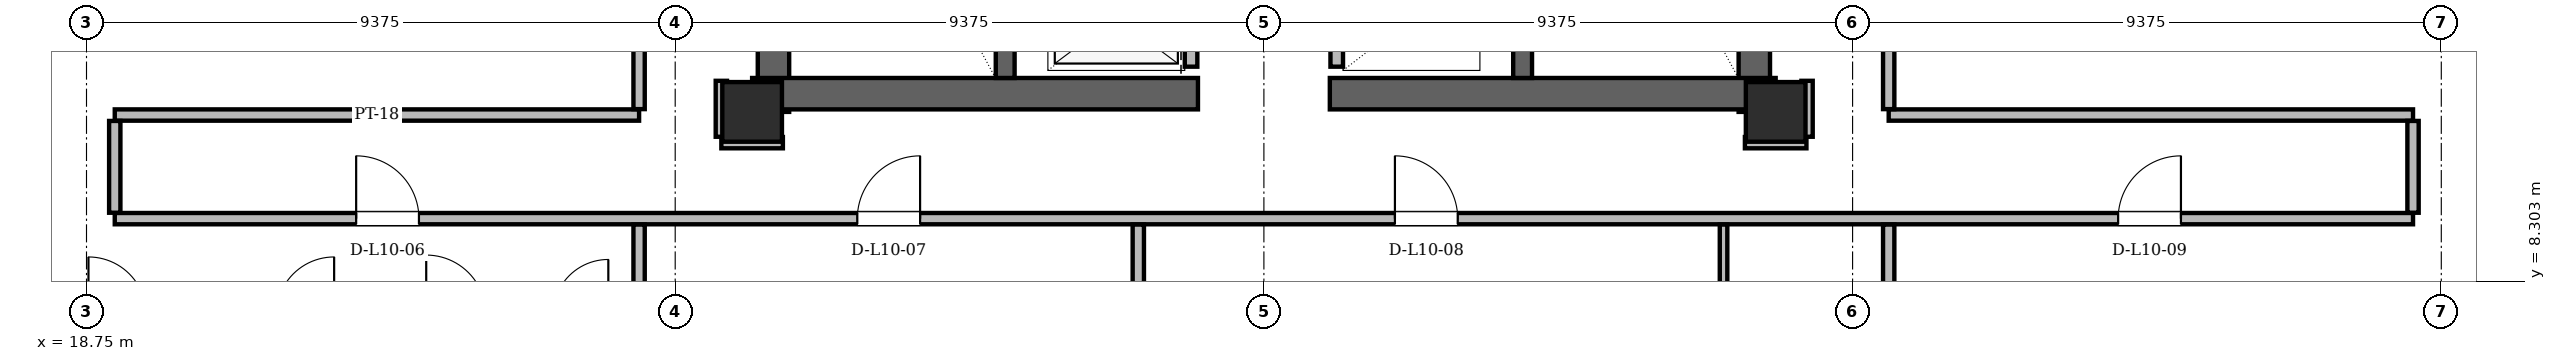
"""IFC4 building model, lengths in metres.
Left out: names, types, materials, properties, quantities, classifications, styles, units other than length and angle.
Written with IfcOpenShell. Run it as: python <this file> out.ifc"""

import sys

from ifc_helpers import new_model, si_unit, direction, frame, frame_2d, origin, origin_2d, place, context, subcontext, project, spatial, rectangle, hollow_rectangle, extrude, element, fill, save


model = new_model("IFC4")
c1 = context("Model", 3, precision=1e-05, world=origin(), true_north=direction((0.0, 1.0)))
c2 = subcontext(c1, "Body", "Model", "MODEL_VIEW")
j1 = project(units=[si_unit("LENGTHUNIT", "METRE"), si_unit("PLANEANGLEUNIT", "RADIAN")], contexts=[c1])
p1 = place(None, origin())
s1 = spatial("IfcSite", under=j1, at=p1, CompositionType="ELEMENT")
p2 = place(p1, origin())
s2 = spatial("IfcBuilding", under=s1, at=p2, CompositionType="ELEMENT")
p3 = place(p2, frame((0.0, 0.0, 41.7)))
s3 = spatial("IfcBuildingStorey", under=s2, at=p3, CompositionType="ELEMENT", Elevation=41.7)
for number, where, z_axis, x_axis in (
    (1, (29.35, 11.0, 0.0), (0.0, 0.0, 1.0), (1.0, 0.0, 0.0)),
    (2, (45.65, 11.0, 0.0), (0.0, 0.0, 1.0), (1.0, 0.0, 0.0)),
):
    element("IfcColumn", number, at=place(p3, frame(where, z_axis=z_axis, x_axis=x_axis)), inside=s3, PredefinedType="COLUMN", context=c2, shape_type="SweptSolid", body=[
        extrude(hollow_rectangle(XDim=0.95, YDim=0.95, WallThickness=0.08, at=origin_2d()), origin(), (0.0, 0.0, 1.0), 3.6),
    ])
for number, where, z_axis, x_axis in (
    (3, (29.69, 11.0, 0.0), (0.0, 0.0, 1.0), (0.0, 1.0, 0.0)),
    (4, (45.31, 11.0, 0.0), (0.0, 0.0, 1.0), (0.0, 1.0, 0.0)),
):
    element("IfcWall", number, at=place(p3, frame(where, z_axis=z_axis, x_axis=x_axis)), inside=s3, PredefinedType="SHEAR", context=c2, shape_type="SweptSolid", body=[
        extrude(rectangle(XDim=13.3, YDim=0.5, at=frame_2d((6.65, 0.0))), origin(), (0.0, 0.0, 1.0), 3.36),
    ])
for number, where, z_axis, x_axis in (
    (5, (29.35, 11.29, 0.0), (0.0, 0.0, 1.0), (1.0, 0.0, 0.0)),
    (6, (38.55, 11.29, 0.0), (0.0, 0.0, 1.0), (1.0, 0.0, 0.0)),
):
    element("IfcWall", number, at=place(p3, frame(where, z_axis=z_axis, x_axis=x_axis)), inside=s3, PredefinedType="SHEAR", context=c2, shape_type="SweptSolid", body=[
        extrude(rectangle(XDim=7.1, YDim=0.5, at=frame_2d((3.55, 0.0))), origin(), (0.0, 0.0, 1.0), 3.36),
    ])
for number, where, z_axis, x_axis in (
    (7, (33.38, 11.54, 0.0), (0.0, 0.0, 1.0), (0.0, 1.0, 0.0)),
    (8, (41.62, 11.54, 0.0), (0.0, 0.0, 1.0), (0.0, 1.0, 0.0)),
):
    element("IfcWall", number, at=place(p3, frame(where, z_axis=z_axis, x_axis=x_axis)), inside=s3, PredefinedType="SHEAR", context=c2, shape_type="SweptSolid", body=[
        extrude(rectangle(XDim=7.62, YDim=0.3, at=frame_2d((3.81, 0.0))), origin(), (0.0, 0.0, 1.0), 3.36),
    ])
p4 = place(p3, frame((13.352, 14.921, 0.0), z_axis=(0.0, 0.0, 1.0), x_axis=(0.499998602503, -0.866026210628, 0.0)))
e9 = element("IfcWall", 9, at=p4, inside=s3, PredefinedType="SOLIDWALL", context=c2, shape_type="SweptSolid", body=[
    extrude(rectangle(XDim=15.178, YDim=0.34, at=frame_2d((7.589, 0.0))), origin(), (0.0, 0.0, 1.0), 2.494),
])
p5 = place(p4, frame((6.75, 0.0, 0.85)))
e10 = element("IfcOpeningElement", 10, at=p5, cuts=e9, PredefinedType="OPENING", context=c2, shape_type="SweptSolid", body=[
    extrude(rectangle(XDim=1.2, YDim=1.48, at=frame_2d((0.6, 0.74))), frame((0.0, 0.17, 0.0), z_axis=(0.0, -1.0, 0.0), x_axis=(1.0, 0.0, 0.0)), (0.0, 0.0, 1.0), 0.34),
])
p6 = place(p4, frame((8.417, 0.0, 0.85)))
e11 = element("IfcOpeningElement", 11, at=p6, cuts=e9, PredefinedType="OPENING", context=c2, shape_type="SweptSolid", body=[
    extrude(rectangle(XDim=0.9, YDim=1.15, at=frame_2d((0.45, 0.575))), frame((0.0, 0.17, 0.0), z_axis=(0.0, -1.0, 0.0), x_axis=(1.0, 0.0, 0.0)), (0.0, 0.0, 1.0), 0.34),
])
p7 = place(p3, frame((54.059, 1.776, 0.0), z_axis=(0.0, 0.0, 1.0), x_axis=(0.499998602503, 0.866026210628, 0.0)))
e12 = element("IfcWall", 12, at=p7, inside=s3, PredefinedType="SOLIDWALL", context=c2, shape_type="SweptSolid", body=[
    extrude(rectangle(XDim=15.178, YDim=0.34, at=frame_2d((7.589, 0.0))), origin(), (0.0, 0.0, 1.0), 2.494),
])
p8 = place(p3, frame((36.34, 11.72, 0.0), z_axis=(0.0, 0.0, 1.0), x_axis=(0.0, 1.0, 0.0)))
e13 = element("IfcWall", 13, at=p8, inside=s3, PredefinedType="PARTITIONING", context=c2, shape_type="SweptSolid", body=[
    extrude(rectangle(XDim=7.6, YDim=0.2, at=frame_2d((3.8, 0.0))), origin(), (0.0, 0.0, 1.0), 3.36),
])
p9 = place(p8, frame((0.255, 0.0, 0.0)))
e14 = element("IfcOpeningElement", 14, at=p9, cuts=e13, PredefinedType="OPENING", context=c2, shape_type="SweptSolid", body=[
    extrude(rectangle(XDim=1.05, YDim=2.15, at=frame_2d((0.525, 1.075))), frame((0.0, 0.1, 0.0), z_axis=(0.0, -1.0, 0.0), x_axis=(1.0, 0.0, 0.0)), (0.0, 0.0, 1.0), 0.2),
])
p10 = place(p8, frame((2.105, 0.0, 0.0)))
e15 = element("IfcOpeningElement", 15, at=p10, cuts=e13, PredefinedType="OPENING", context=c2, shape_type="SweptSolid", body=[
    extrude(rectangle(XDim=1.05, YDim=2.15, at=frame_2d((0.525, 1.075))), frame((0.0, 0.1, 0.0), z_axis=(0.0, -1.0, 0.0), x_axis=(1.0, 0.0, 0.0)), (0.0, 0.0, 1.0), 0.2),
])
p11 = place(p8, frame((3.955, 0.0, 0.0)))
e16 = element("IfcOpeningElement", 16, at=p11, cuts=e13, PredefinedType="OPENING", context=c2, shape_type="SweptSolid", body=[
    extrude(rectangle(XDim=1.05, YDim=2.15, at=frame_2d((0.525, 1.075))), frame((0.0, 0.1, 0.0), z_axis=(0.0, -1.0, 0.0), x_axis=(1.0, 0.0, 0.0)), (0.0, 0.0, 1.0), 0.2),
])
p12 = place(p3, frame((38.66, 11.72, 0.0), z_axis=(0.0, 0.0, 1.0), x_axis=(0.0, 1.0, 0.0)))
e17 = element("IfcWall", 17, at=p12, inside=s3, PredefinedType="PARTITIONING", context=c2, shape_type="SweptSolid", body=[
    extrude(rectangle(XDim=9.1, YDim=0.2, at=frame_2d((4.55, 0.0))), origin(), (0.0, 0.0, 1.0), 3.36),
])
p13 = place(p3, frame((19.2, 9.3, 0.0), z_axis=(0.0, 0.0, 1.0), x_axis=(1.0, 0.0, 0.0)))
e18 = element("IfcWall", 18, at=p13, inside=s3, PredefinedType="PARTITIONING", context=c2, shape_type="SweptSolid", body=[
    extrude(rectangle(XDim=36.6, YDim=0.18, at=frame_2d((18.3, 0.0))), origin(), (0.0, 0.0, 1.0), 2.738),
])
p14 = place(p13, frame((3.844, 0.0, 0.0)))
e19 = element("IfcOpeningElement", 19, at=p14, cuts=e18, PredefinedType="OPENING", context=c2, shape_type="SweptSolid", body=[
    extrude(rectangle(XDim=1.0, YDim=2.18, at=frame_2d((0.5, 1.09))), frame((0.0, 0.09, 0.0), z_axis=(0.0, -1.0, 0.0), x_axis=(1.0, 0.0, 0.0)), (0.0, 0.0, 1.0), 0.18),
])
p15 = place(p13, frame((11.825, 0.0, 0.0)))
e20 = element("IfcOpeningElement", 20, at=p15, cuts=e18, PredefinedType="OPENING", context=c2, shape_type="SweptSolid", body=[
    extrude(rectangle(XDim=1.0, YDim=2.18, at=frame_2d((0.5, 1.09))), frame((0.0, 0.09, 0.0), z_axis=(0.0, -1.0, 0.0), x_axis=(1.0, 0.0, 0.0)), (0.0, 0.0, 1.0), 0.18),
])
p16 = place(p13, frame((20.387, 0.0, 0.0)))
e21 = element("IfcOpeningElement", 21, at=p16, cuts=e18, PredefinedType="OPENING", context=c2, shape_type="SweptSolid", body=[
    extrude(rectangle(XDim=1.0, YDim=2.18, at=frame_2d((0.5, 1.09))), frame((0.0, 0.09, 0.0), z_axis=(0.0, -1.0, 0.0), x_axis=(1.0, 0.0, 0.0)), (0.0, 0.0, 1.0), 0.18),
])
p17 = place(p13, frame((31.904, 0.0, 0.0)))
e22 = element("IfcOpeningElement", 22, at=p17, cuts=e18, PredefinedType="OPENING", context=c2, shape_type="SweptSolid", body=[
    extrude(rectangle(XDim=1.0, YDim=2.18, at=frame_2d((0.5, 1.09))), frame((0.0, 0.09, 0.0), z_axis=(0.0, -1.0, 0.0), x_axis=(1.0, 0.0, 0.0)), (0.0, 0.0, 1.0), 0.18),
])
for number, where, z_axis, x_axis in (
    (23, (28.86, 10.51, 0.0), (0.0, 0.0, 1.0), (1.0, 0.0, 0.0)),
    (24, (45.16, 10.51, 0.0), (0.0, 0.0, 1.0), (1.0, 0.0, 0.0)),
):
    element("IfcWall", number, at=place(p3, frame(where, z_axis=z_axis, x_axis=x_axis)), inside=s3, PredefinedType="PARTITIONING", context=c2, shape_type="SweptSolid", body=[
        extrude(rectangle(XDim=0.98, YDim=0.18, at=frame_2d((0.49, 0.0))), origin(), (0.0, 0.0, 1.0), 2.738),
    ])
for number, where, z_axis, x_axis in (
    (25, (19.2, 10.95, 0.0), (0.0, 0.0, 1.0), (1.0, 0.0, 0.0)),
    (26, (47.45, 10.95, 0.0), (0.0, 0.0, 1.0), (1.0, 0.0, 0.0)),
):
    element("IfcWall", number, at=place(p3, frame(where, z_axis=z_axis, x_axis=x_axis)), inside=s3, PredefinedType="PARTITIONING", context=c2, shape_type="SweptSolid", body=[
        extrude(rectangle(XDim=8.35, YDim=0.18, at=frame_2d((4.175, 0.0))), origin(), (0.0, 0.0, 1.0), 3.36),
    ])
p18 = place(p3, frame((19.2, 9.394, 0.0), z_axis=(0.0, 0.0, 1.0), x_axis=(0.0, 1.0, 0.0)))
e27 = element("IfcWall", 27, at=p18, inside=s3, PredefinedType="PARTITIONING", context=c2, shape_type="SweptSolid", body=[
    extrude(rectangle(XDim=1.462, YDim=0.18, at=frame_2d((0.731, 0.0))), origin(), (0.0, 0.0, 1.0), 3.36),
])
p19 = place(p3, frame((27.55, 1.95, 0.0), z_axis=(0.0, 0.0, 1.0), x_axis=(0.0, 1.0, 0.0)))
e28 = element("IfcWall", 28, at=p19, inside=s3, PredefinedType="PARTITIONING", context=c2, shape_type="SweptSolid", body=[
    extrude(rectangle(XDim=7.256, YDim=0.18, at=frame_2d((3.628, 0.0))), origin(), (0.0, 0.0, 1.0), 2.738),
])
p20 = place(p3, frame((27.55, 11.044, 0.0), z_axis=(0.0, 0.0, 1.0), x_axis=(0.0, 1.0, 0.0)))
e29 = element("IfcWall", 29, at=p20, inside=s3, PredefinedType="PARTITIONING", context=c2, shape_type="SweptSolid", body=[
    extrude(rectangle(XDim=28.121, YDim=0.18, at=frame_2d((14.061, 0.0))), origin(), (0.0, 0.0, 1.0), 2.494),
])
p21 = place(p20, frame((8.121, 0.0, 0.0)))
e30 = element("IfcOpeningElement", 30, at=p21, cuts=e29, PredefinedType="OPENING", context=c2, shape_type="SweptSolid", body=[
    extrude(rectangle(XDim=1.0, YDim=2.18, at=frame_2d((0.5, 1.09))), frame((0.0, 0.09, 0.0), z_axis=(0.0, -1.0, 0.0), x_axis=(1.0, 0.0, 0.0)), (0.0, 0.0, 1.0), 0.18),
])
p22 = place(p3, frame((28.86, 10.604, 0.0), z_axis=(0.0, 0.0, 1.0), x_axis=(0.0, 1.0, 0.0)))
e31 = element("IfcWall", 31, at=p22, inside=s3, PredefinedType="PARTITIONING", context=c2, shape_type="SweptSolid", body=[
    extrude(rectangle(XDim=0.891, YDim=0.18, at=frame_2d((0.446, 0.0))), origin(), (0.0, 0.0, 1.0), 2.738),
])
p23 = place(p3, frame((35.5, 1.95, 0.0), z_axis=(0.0, 0.0, 1.0), x_axis=(0.0, 1.0, 0.0)))
e32 = element("IfcWall", 32, at=p23, inside=s3, PredefinedType="PARTITIONING", context=c2, shape_type="SweptSolid", body=[
    extrude(rectangle(XDim=7.256, YDim=0.18, at=frame_2d((3.628, 0.0))), origin(), (0.0, 0.0, 1.0), 3.36),
])
p24 = place(p3, frame((44.82, 1.95, 0.0), z_axis=(0.0, 0.0, 1.0), x_axis=(0.0, 1.0, 0.0)))
e33 = element("IfcWall", 33, at=p24, inside=s3, PredefinedType="PARTITIONING", context=c2, shape_type="SweptSolid", body=[
    extrude(rectangle(XDim=7.256, YDim=0.12, at=frame_2d((3.628, 0.0))), origin(), (0.0, 0.0, 1.0), 2.946),
])
p25 = place(p24, frame((3.223, 0.0, 0.0)))
e34 = element("IfcOpeningElement", 34, at=p25, cuts=e33, PredefinedType="OPENING", context=c2, shape_type="SweptSolid", body=[
    extrude(rectangle(XDim=0.88, YDim=2.08, at=frame_2d((0.44, 1.04))), frame((0.0, 0.06, 0.0), z_axis=(0.0, -1.0, 0.0), x_axis=(1.0, 0.0, 0.0)), (0.0, 0.0, 1.0), 0.12),
])
p26 = place(p3, frame((46.15, 10.604, 0.0), z_axis=(0.0, 0.0, 1.0), x_axis=(0.0, 1.0, 0.0)))
e35 = element("IfcWall", 35, at=p26, inside=s3, PredefinedType="PARTITIONING", context=c2, shape_type="SweptSolid", body=[
    extrude(rectangle(XDim=0.891, YDim=0.18, at=frame_2d((0.446, 0.0))), origin(), (0.0, 0.0, 1.0), 2.738),
])
p27 = place(p3, frame((47.45, 1.95, 0.0), z_axis=(0.0, 0.0, 1.0), x_axis=(0.0, 1.0, 0.0)))
e36 = element("IfcWall", 36, at=p27, inside=s3, PredefinedType="PARTITIONING", context=c2, shape_type="SweptSolid", body=[
    extrude(rectangle(XDim=7.256, YDim=0.18, at=frame_2d((3.628, 0.0))), origin(), (0.0, 0.0, 1.0), 2.738),
])
p28 = place(p3, frame((47.45, 11.044, 0.0), z_axis=(0.0, 0.0, 1.0), x_axis=(0.0, 1.0, 0.0)))
e37 = element("IfcWall", 37, at=p28, inside=s3, PredefinedType="PARTITIONING", context=c2, shape_type="SweptSolid", body=[
    extrude(rectangle(XDim=28.121, YDim=0.18, at=frame_2d((14.061, 0.0))), origin(), (0.0, 0.0, 1.0), 2.494),
])
p29 = place(p28, frame((10.822, 0.0, 0.0)))
e38 = element("IfcOpeningElement", 38, at=p29, cuts=e37, PredefinedType="OPENING", context=c2, shape_type="SweptSolid", body=[
    extrude(rectangle(XDim=1.0, YDim=2.18, at=frame_2d((0.5, 1.09))), frame((0.0, 0.09, 0.0), z_axis=(0.0, -1.0, 0.0), x_axis=(1.0, 0.0, 0.0)), (0.0, 0.0, 1.0), 0.18),
])
p30 = place(p3, frame((55.8, 9.394, 0.0), z_axis=(0.0, 0.0, 1.0), x_axis=(0.0, 1.0, 0.0)))
e39 = element("IfcWall", 39, at=p30, inside=s3, PredefinedType="PARTITIONING", context=c2, shape_type="SweptSolid", body=[
    extrude(rectangle(XDim=1.462, YDim=0.18, at=frame_2d((0.731, 0.0))), origin(), (0.0, 0.0, 1.0), 3.36),
])
p31 = place(p14, origin())
e40 = element("IfcDoor", 40, at=p31, inside=s3, OperationType="SINGLE_SWING_LEFT", PredefinedType="DOOR", context=c2, shape_type="SweptSolid", body=[
    extrude(rectangle(XDim=1.0, YDim=2.18, at=frame_2d((0.5, 1.09))), frame((0.0, 0.025, 0.0), z_axis=(0.0, -1.0, 0.0), x_axis=(1.0, 0.0, 0.0)), (0.0, 0.0, 1.0), 0.05),
])
fill(e19, e40)
p32 = place(p15, origin())
e41 = element("IfcDoor", 41, at=p32, inside=s3, OperationType="SINGLE_SWING_RIGHT", PredefinedType="DOOR", context=c2, shape_type="SweptSolid", body=[
    extrude(rectangle(XDim=1.0, YDim=2.18, at=frame_2d((0.5, 1.09))), frame((0.0, 0.025, 0.0), z_axis=(0.0, -1.0, 0.0), x_axis=(1.0, 0.0, 0.0)), (0.0, 0.0, 1.0), 0.05),
])
fill(e20, e41)
p33 = place(p16, origin())
e42 = element("IfcDoor", 42, at=p33, inside=s3, OperationType="SINGLE_SWING_LEFT", PredefinedType="DOOR", context=c2, shape_type="SweptSolid", body=[
    extrude(rectangle(XDim=1.0, YDim=2.18, at=frame_2d((0.5, 1.09))), frame((0.0, 0.025, 0.0), z_axis=(0.0, -1.0, 0.0), x_axis=(1.0, 0.0, 0.0)), (0.0, 0.0, 1.0), 0.05),
])
fill(e21, e42)
p34 = place(p17, origin())
e43 = element("IfcDoor", 43, at=p34, inside=s3, OperationType="SINGLE_SWING_RIGHT", PredefinedType="DOOR", context=c2, shape_type="SweptSolid", body=[
    extrude(rectangle(XDim=1.0, YDim=2.18, at=frame_2d((0.5, 1.09))), frame((0.0, 0.025, 0.0), z_axis=(0.0, -1.0, 0.0), x_axis=(1.0, 0.0, 0.0)), (0.0, 0.0, 1.0), 0.05),
])
fill(e22, e43)
save(model, sys.argv[1])
